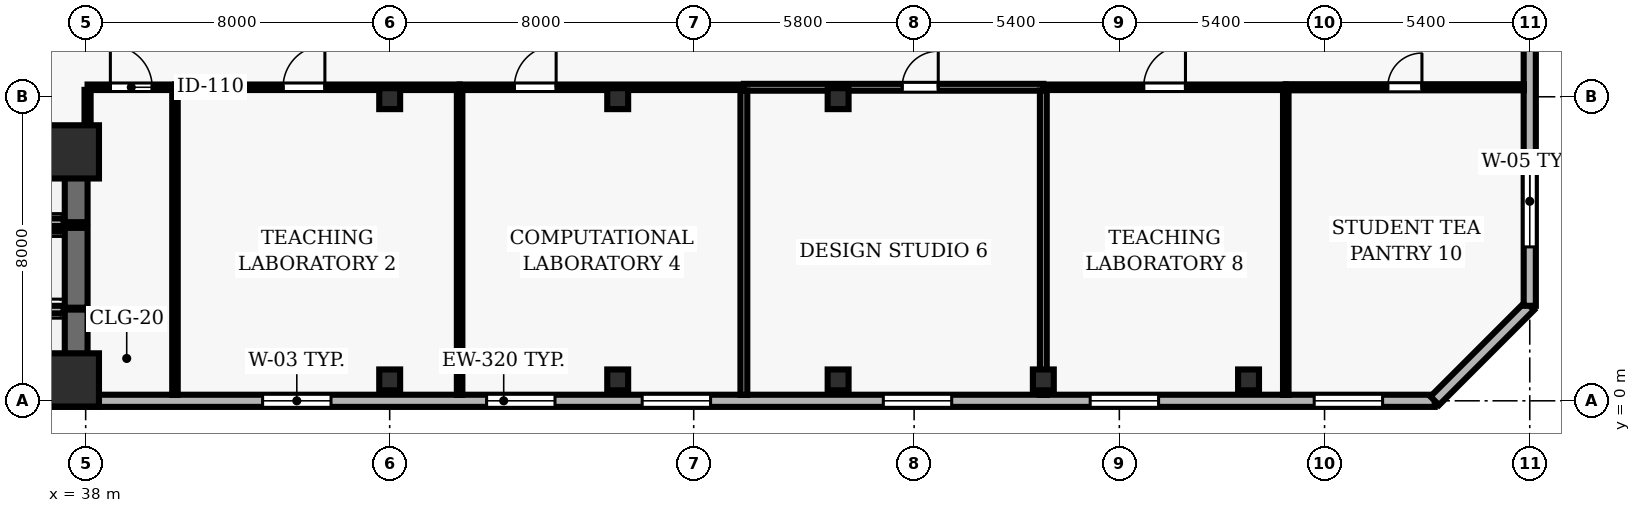
"""IFC4 building model, lengths in metres.
Left out: names, types, materials, properties, quantities, classifications, styles, units other than length and angle.
Written with IfcOpenShell. Run it as: python <this file> out.ifc"""

import sys

from ifc_helpers import new_model, si_unit, direction, frame, frame_2d, origin, origin_2d, place, context, subcontext, project, spatial, rectangle, hollow_rectangle, extrude, element, fill, save


model = new_model("IFC4")
c1 = context("Model", 3, precision=1e-05, world=origin(), true_north=direction((0.0, 1.0)))
c2 = subcontext(c1, "Body", "Model", "MODEL_VIEW")
j1 = project(units=[si_unit("LENGTHUNIT", "METRE"), si_unit("PLANEANGLEUNIT", "RADIAN")], contexts=[c1])
p1 = place(None, origin())
s1 = spatial("IfcSite", under=j1, at=p1, CompositionType="ELEMENT")
p2 = place(p1, origin())
s2 = spatial("IfcBuilding", under=s1, at=p2, CompositionType="ELEMENT")
p3 = place(p2, frame((0.0, 0.0, 62.2)))
s3 = spatial("IfcBuildingStorey", under=s2, at=p3, CompositionType="ELEMENT", Elevation=62.2)
for number, where, z_axis, x_axis in (
    (1, (37.65, 0.55, 0.0), (0.0, 0.0, 1.0), (1.0, 0.0, 0.0)),
    (2, (37.65, 6.55, 0.0), (0.0, 0.0, 1.0), (1.0, 0.0, 0.0)),
):
    element("IfcColumn", number, at=place(p3, frame(where, z_axis=z_axis, x_axis=x_axis)), inside=s3, PredefinedType="COLUMN", context=c2, shape_type="SweptSolid", body=[
        extrude(rectangle(XDim=1.4, YDim=1.4, at=origin_2d()), origin(), (0.0, 0.0, 1.0), 3.9),
    ])
for number, where, z_axis, x_axis in (
    (3, (46.0, 0.55, 0.0), (0.0, 0.0, 1.0), (1.0, 0.0, 0.0)),
    (4, (46.0, 7.95, 0.0), (0.0, 0.0, 1.0), (1.0, 0.0, 0.0)),
    (5, (52.0, 0.55, 0.0), (0.0, 0.0, 1.0), (1.0, 0.0, 0.0)),
    (6, (52.0, 7.95, 0.0), (0.0, 0.0, 1.0), (1.0, 0.0, 0.0)),
    (7, (57.8, 0.55, 0.0), (0.0, 0.0, 1.0), (1.0, 0.0, 0.0)),
    (8, (57.8, 7.95, 0.0), (0.0, 0.0, 1.0), (1.0, 0.0, 0.0)),
    (9, (63.2, 0.55, 0.0), (0.0, 0.0, 1.0), (1.0, 0.0, 0.0)),
    (10, (68.6, 0.55, 0.0), (0.0, 0.0, 1.0), (1.0, 0.0, 0.0)),
):
    element("IfcColumn", number, at=place(p3, frame(where, z_axis=z_axis, x_axis=x_axis)), inside=s3, PredefinedType="COLUMN", context=c2, shape_type="SweptSolid", body=[
        extrude(hollow_rectangle(XDim=0.55, YDim=0.55, WallThickness=0.025, at=origin_2d()), origin(), (0.0, 0.0, 1.0), 3.9),
    ])
p4 = place(p3, frame((24.5, 0.0, 0.0), z_axis=(0.0, 0.0, 1.0), x_axis=(1.0, 0.0, 0.0)))
e11 = element("IfcWall", 11, at=p4, inside=s3, PredefinedType="SOLIDWALL", context=c2, shape_type="SweptSolid", body=[
    extrude(rectangle(XDim=49.0, YDim=0.32, at=frame_2d((24.5, 0.0))), origin(), (0.0, 0.0, 1.0), 3.69),
])
p5 = place(p4, frame((1.822, 0.0, 0.9)))
e12 = element("IfcOpeningElement", 12, at=p5, cuts=e11, PredefinedType="OPENING", context=c2, shape_type="SweptSolid", body=[
    extrude(rectangle(XDim=1.8, YDim=1.6, at=frame_2d((0.9, 0.8))), frame((0.0, 0.17, 0.0), z_axis=(0.0, -1.0, 0.0), x_axis=(1.0, 0.0, 0.0)), (0.0, 0.0, 1.0), 0.34),
])
p6 = place(p4, frame((18.156, 0.0, 0.9)))
e13 = element("IfcOpeningElement", 13, at=p6, cuts=e11, PredefinedType="OPENING", context=c2, shape_type="SweptSolid", body=[
    extrude(rectangle(XDim=1.8, YDim=1.6, at=frame_2d((0.9, 0.8))), frame((0.0, 0.17, 0.0), z_axis=(0.0, -1.0, 0.0), x_axis=(1.0, 0.0, 0.0)), (0.0, 0.0, 1.0), 0.34),
])
p7 = place(p4, frame((24.05, 0.0, 0.9)))
e14 = element("IfcOpeningElement", 14, at=p7, cuts=e11, PredefinedType="OPENING", context=c2, shape_type="SweptSolid", body=[
    extrude(rectangle(XDim=1.8, YDim=1.6, at=frame_2d((0.9, 0.8))), frame((0.0, 0.17, 0.0), z_axis=(0.0, -1.0, 0.0), x_axis=(1.0, 0.0, 0.0)), (0.0, 0.0, 1.0), 0.34),
])
p8 = place(p4, frame((28.144, 0.0, 0.9)))
e15 = element("IfcOpeningElement", 15, at=p8, cuts=e11, PredefinedType="OPENING", context=c2, shape_type="SweptSolid", body=[
    extrude(rectangle(XDim=1.8, YDim=1.6, at=frame_2d((0.9, 0.8))), frame((0.0, 0.17, 0.0), z_axis=(0.0, -1.0, 0.0), x_axis=(1.0, 0.0, 0.0)), (0.0, 0.0, 1.0), 0.34),
])
p9 = place(p4, frame((34.489, 0.0, 0.9)))
e16 = element("IfcOpeningElement", 16, at=p9, cuts=e11, PredefinedType="OPENING", context=c2, shape_type="SweptSolid", body=[
    extrude(rectangle(XDim=1.8, YDim=1.6, at=frame_2d((0.9, 0.8))), frame((0.0, 0.17, 0.0), z_axis=(0.0, -1.0, 0.0), x_axis=(1.0, 0.0, 0.0)), (0.0, 0.0, 1.0), 0.34),
])
p10 = place(p4, frame((39.933, 0.0, 0.9)))
e17 = element("IfcOpeningElement", 17, at=p10, cuts=e11, PredefinedType="OPENING", context=c2, shape_type="SweptSolid", body=[
    extrude(rectangle(XDim=1.8, YDim=1.6, at=frame_2d((0.9, 0.8))), frame((0.0, 0.17, 0.0), z_axis=(0.0, -1.0, 0.0), x_axis=(1.0, 0.0, 0.0)), (0.0, 0.0, 1.0), 0.34),
])
p11 = place(p4, frame((45.828, 0.0, 0.9)))
e18 = element("IfcOpeningElement", 18, at=p11, cuts=e11, PredefinedType="OPENING", context=c2, shape_type="SweptSolid", body=[
    extrude(rectangle(XDim=1.8, YDim=1.6, at=frame_2d((0.9, 0.8))), frame((0.0, 0.17, 0.0), z_axis=(0.0, -1.0, 0.0), x_axis=(1.0, 0.0, 0.0)), (0.0, 0.0, 1.0), 0.34),
])
p12 = place(p3, frame((73.5, 0.0, 0.0), z_axis=(0.0, 0.0, 1.0), x_axis=(0.707106781187, 0.707106781187, 0.0)))
e19 = element("IfcWall", 19, at=p12, inside=s3, PredefinedType="SOLIDWALL", context=c2, shape_type="SweptSolid", body=[
    extrude(rectangle(XDim=3.536, YDim=0.32, at=frame_2d((1.768, 0.0))), origin(), (0.0, 0.0, 1.0), 3.69),
])
p13 = place(p3, frame((76.0, 2.5, 0.0), z_axis=(0.0, 0.0, 1.0), x_axis=(0.0, 1.0, 0.0)))
e20 = element("IfcWall", 20, at=p13, inside=s3, PredefinedType="SOLIDWALL", context=c2, shape_type="SweptSolid", body=[
    extrude(rectangle(XDim=11.0, YDim=0.32, at=frame_2d((5.5, 0.0))), origin(), (0.0, 0.0, 1.0), 3.69),
])
p14 = place(p13, frame((1.55, 0.0, 0.9)))
e21 = element("IfcOpeningElement", 21, at=p14, cuts=e20, PredefinedType="OPENING", context=c2, shape_type="SweptSolid", body=[
    extrude(rectangle(XDim=2.4, YDim=1.6, at=frame_2d((1.2, 0.8))), frame((0.0, 0.17, 0.0), z_axis=(0.0, -1.0, 0.0), x_axis=(1.0, 0.0, 0.0)), (0.0, 0.0, 1.0), 0.34),
])
p15 = place(p3, frame((37.75, 0.3, 0.0), z_axis=(0.0, 0.0, 1.0), x_axis=(0.0, 1.0, 0.0)))
e22 = element("IfcWall", 22, at=p15, inside=s3, PredefinedType="SHEAR", context=c2, shape_type="SweptSolid", body=[
    extrude(rectangle(XDim=2.1, YDim=0.6, at=frame_2d((1.05, 0.0))), origin(), (0.0, 0.0, 1.0), 3.69),
])
for number, where, z_axis, x_axis in (
    (23, (35.28, 0.3, 0.0), (0.0, 0.0, 1.0), (1.0, 0.0, 0.0)),
    (24, (37.42, 2.4, 0.0), (0.0, 0.0, 1.0), (-1.0, 0.0, 0.0)),
):
    element("IfcWall", number, at=place(p3, frame(where, z_axis=z_axis, x_axis=x_axis)), inside=s3, PredefinedType="SOLIDWALL", context=c2, shape_type="SweptSolid", body=[
        extrude(rectangle(XDim=2.14, YDim=0.2, at=frame_2d((1.07, 0.0))), origin(), (0.0, 0.0, 1.0), 3.69),
    ])
p16 = place(p3, frame((37.75, 2.45, 0.0), z_axis=(0.0, 0.0, 1.0), x_axis=(0.0, 1.0, 0.0)))
e25 = element("IfcWall", 25, at=p16, inside=s3, PredefinedType="SHEAR", context=c2, shape_type="SweptSolid", body=[
    extrude(rectangle(XDim=2.1, YDim=0.6, at=frame_2d((1.05, 0.0))), origin(), (0.0, 0.0, 1.0), 3.69),
])
p17 = place(p3, frame((37.42, 4.55, 0.0), z_axis=(0.0, 0.0, 1.0), x_axis=(-1.0, 0.0, 0.0)))
e26 = element("IfcWall", 26, at=p17, inside=s3, PredefinedType="SOLIDWALL", context=c2, shape_type="SweptSolid", body=[
    extrude(rectangle(XDim=2.14, YDim=0.2, at=frame_2d((1.07, 0.0))), origin(), (0.0, 0.0, 1.0), 3.69),
])
p18 = place(p3, frame((37.75, 4.7, 0.0), z_axis=(0.0, 0.0, 1.0), x_axis=(0.0, 1.0, 0.0)))
e27 = element("IfcWall", 27, at=p18, inside=s3, PredefinedType="SHEAR", context=c2, shape_type="SweptSolid", body=[
    extrude(rectangle(XDim=2.25, YDim=0.6, at=frame_2d((1.125, 0.0))), origin(), (0.0, 0.0, 1.0), 3.69),
])
for number, where, z_axis, x_axis in (
    (28, (35.28, 4.7, 0.0), (0.0, 0.0, 1.0), (1.0, 0.0, 0.0)),
    (29, (37.42, 6.95, 0.0), (0.0, 0.0, 1.0), (-1.0, 0.0, 0.0)),
):
    element("IfcWall", number, at=place(p3, frame(where, z_axis=z_axis, x_axis=x_axis)), inside=s3, PredefinedType="SOLIDWALL", context=c2, shape_type="SweptSolid", body=[
        extrude(rectangle(XDim=2.14, YDim=0.2, at=frame_2d((1.07, 0.0))), origin(), (0.0, 0.0, 1.0), 3.69),
    ])
p19 = place(p3, frame((38.05, 8.25, 0.0), z_axis=(0.0, 0.0, 1.0), x_axis=(1.0, 0.0, 0.0)))
e30 = element("IfcWall", 30, at=p19, inside=s3, PredefinedType="PARTITIONING", context=c2, shape_type="SweptSolid", body=[
    extrude(rectangle(XDim=2.3, YDim=0.145, at=frame_2d((1.15, 0.0))), origin(), (0.0, 0.0, 1.0), 2.995),
])
p20 = place(p19, frame((0.6, 0.0, 0.0)))
e31 = element("IfcOpeningElement", 31, at=p20, cuts=e30, PredefinedType="OPENING", context=c2, shape_type="SweptSolid", body=[
    extrude(rectangle(XDim=1.1, YDim=2.15, at=frame_2d((0.55, 1.075))), frame((0.0, 0.083, 0.0), z_axis=(0.0, -1.0, 0.0), x_axis=(1.0, 0.0, 0.0)), (0.0, 0.0, 1.0), 0.165),
])
p21 = place(p3, frame((40.35, 8.25, 0.0), z_axis=(0.0, 0.0, 1.0), x_axis=(1.0, 0.0, 0.0)))
e32 = element("IfcWall", 32, at=p21, inside=s3, PredefinedType="PARTITIONING", context=c2, shape_type="SweptSolid", body=[
    extrude(rectangle(XDim=7.49, YDim=0.145, at=frame_2d((3.745, 0.0))), origin(), (0.0, 0.0, 1.0), 2.995),
])
p22 = place(p21, frame((2.845, 0.0, 0.0)))
e33 = element("IfcOpeningElement", 33, at=p22, cuts=e32, PredefinedType="OPENING", context=c2, shape_type="SweptSolid", body=[
    extrude(rectangle(XDim=1.1, YDim=2.15, at=frame_2d((0.55, 1.075))), frame((0.0, 0.083, 0.0), z_axis=(0.0, -1.0, 0.0), x_axis=(1.0, 0.0, 0.0)), (0.0, 0.0, 1.0), 0.165),
])
p23 = place(p3, frame((47.84, 8.25, 0.0), z_axis=(0.0, 0.0, 1.0), x_axis=(1.0, 0.0, 0.0)))
e34 = element("IfcWall", 34, at=p23, inside=s3, PredefinedType="PARTITIONING", context=c2, shape_type="SweptSolid", body=[
    extrude(rectangle(XDim=7.48, YDim=0.145, at=frame_2d((3.74, 0.0))), origin(), (0.0, 0.0, 1.0), 2.995),
])
p24 = place(p23, frame((1.44, 0.0, 0.0)))
e35 = element("IfcOpeningElement", 35, at=p24, cuts=e34, PredefinedType="OPENING", context=c2, shape_type="SweptSolid", body=[
    extrude(rectangle(XDim=1.1, YDim=2.15, at=frame_2d((0.55, 1.075))), frame((0.0, 0.083, 0.0), z_axis=(0.0, -1.0, 0.0), x_axis=(1.0, 0.0, 0.0)), (0.0, 0.0, 1.0), 0.165),
])
p25 = place(p3, frame((55.32, 8.25, 0.0), z_axis=(0.0, 0.0, 1.0), x_axis=(1.0, 0.0, 0.0)))
e36 = element("IfcWall", 36, at=p25, inside=s3, PredefinedType="PARTITIONING", context=c2, shape_type="SweptSolid", body=[
    extrude(rectangle(XDim=7.88, YDim=0.18, at=frame_2d((3.94, 0.0))), origin(), (0.0, 0.0, 1.0), 2.995),
])
p26 = place(p25, frame((4.165, 0.0, 0.0)))
e37 = element("IfcOpeningElement", 37, at=p26, cuts=e36, PredefinedType="OPENING", context=c2, shape_type="SweptSolid", body=[
    extrude(rectangle(XDim=0.95, YDim=2.1, at=frame_2d((0.475, 1.05))), frame((0.0, 0.1, 0.0), z_axis=(0.0, -1.0, 0.0), x_axis=(1.0, 0.0, 0.0)), (0.0, 0.0, 1.0), 0.2),
])
p27 = place(p3, frame((63.2, 8.25, 0.0), z_axis=(0.0, 0.0, 1.0), x_axis=(1.0, 0.0, 0.0)))
e38 = element("IfcWall", 38, at=p27, inside=s3, PredefinedType="PARTITIONING", context=c2, shape_type="SweptSolid", body=[
    extrude(rectangle(XDim=6.38, YDim=0.145, at=frame_2d((3.19, 0.0))), origin(), (0.0, 0.0, 1.0), 3.69),
])
p28 = place(p27, frame((2.64, 0.0, 0.0)))
e39 = element("IfcOpeningElement", 39, at=p28, cuts=e38, PredefinedType="OPENING", context=c2, shape_type="SweptSolid", body=[
    extrude(rectangle(XDim=1.1, YDim=2.15, at=frame_2d((0.55, 1.075))), frame((0.0, 0.083, 0.0), z_axis=(0.0, -1.0, 0.0), x_axis=(1.0, 0.0, 0.0)), (0.0, 0.0, 1.0), 0.165),
])
p29 = place(p3, frame((69.58, 8.25, 0.0), z_axis=(0.0, 0.0, 1.0), x_axis=(1.0, 0.0, 0.0)))
e40 = element("IfcWall", 40, at=p29, inside=s3, PredefinedType="PARTITIONING", context=c2, shape_type="SweptSolid", body=[
    extrude(rectangle(XDim=6.265, YDim=0.16, at=frame_2d((3.132, 0.0))), origin(), (0.0, 0.0, 1.0), 3.69),
])
p30 = place(p29, frame((2.683, 0.0, 0.0)))
e41 = element("IfcOpeningElement", 41, at=p30, cuts=e40, PredefinedType="OPENING", context=c2, shape_type="SweptSolid", body=[
    extrude(rectangle(XDim=0.9, YDim=2.1, at=frame_2d((0.45, 1.05))), frame((0.0, 0.09, 0.0), z_axis=(0.0, -1.0, 0.0), x_axis=(1.0, 0.0, 0.0)), (0.0, 0.0, 1.0), 0.18),
])
p31 = place(p3, frame((38.05, 7.05, 0.0), z_axis=(0.0, 0.0, 1.0), x_axis=(0.0, 1.0, 0.0)))
e42 = element("IfcWall", 42, at=p31, inside=s3, PredefinedType="PARTITIONING", context=c2, shape_type="SweptSolid", body=[
    extrude(rectangle(XDim=1.132, YDim=0.16, at=frame_2d((0.566, 0.0))), origin(), (0.0, 0.0, 1.0), 2.995),
])
for number, where, z_axis, x_axis in (
    (43, (40.35, 0.155, 0.0), (0.0, 0.0, 1.0), (0.0, 1.0, 0.0)),
    (44, (47.84, 0.155, 0.0), (0.0, 0.0, 1.0), (0.0, 1.0, 0.0)),
):
    element("IfcWall", number, at=place(p3, frame(where, z_axis=z_axis, x_axis=x_axis)), inside=s3, PredefinedType="PARTITIONING", context=c2, shape_type="SweptSolid", body=[
        extrude(rectangle(XDim=8.027, YDim=0.145, at=frame_2d((4.013, 0.0))), origin(), (0.0, 0.0, 1.0), 3.69),
    ])
p32 = place(p3, frame((55.32, 0.155, 0.0), z_axis=(0.0, 0.0, 1.0), x_axis=(0.0, 1.0, 0.0)))
e45 = element("IfcWall", 45, at=p32, inside=s3, PredefinedType="PARTITIONING", context=c2, shape_type="SweptSolid", body=[
    extrude(rectangle(XDim=8.01, YDim=0.18, at=frame_2d((4.005, 0.0))), origin(), (0.0, 0.0, 1.0), 3.69),
])
p33 = place(p3, frame((63.2, 0.155, 0.0), z_axis=(0.0, 0.0, 1.0), x_axis=(0.0, 1.0, 0.0)))
e46 = element("IfcWall", 46, at=p33, inside=s3, PredefinedType="PARTITIONING", context=c2, shape_type="SweptSolid", body=[
    extrude(rectangle(XDim=8.01, YDim=0.18, at=frame_2d((4.005, 0.0))), origin(), (0.0, 0.0, 1.0), 2.995),
])
p34 = place(p3, frame((69.58, 0.155, 0.0), z_axis=(0.0, 0.0, 1.0), x_axis=(0.0, 1.0, 0.0)))
e47 = element("IfcWall", 47, at=p34, inside=s3, PredefinedType="PARTITIONING", context=c2, shape_type="SweptSolid", body=[
    extrude(rectangle(XDim=8.02, YDim=0.145, at=frame_2d((4.01, 0.0))), origin(), (0.0, 0.0, 1.0), 3.69),
])
p35 = place(p6, origin())
e48 = element("IfcWindow", 48, at=p35, inside=s3, PartitioningType="SINGLE_PANEL", PredefinedType="WINDOW", context=c2, shape_type="SweptSolid", body=[
    extrude(rectangle(XDim=1.8, YDim=1.6, at=frame_2d((0.9, 0.8))), frame((0.0, 0.03, 0.0), z_axis=(0.0, -1.0, 0.0), x_axis=(1.0, 0.0, 0.0)), (0.0, 0.0, 1.0), 0.06),
])
fill(e13, e48)
p36 = place(p7, origin())
e49 = element("IfcWindow", 49, at=p36, inside=s3, PartitioningType="SINGLE_PANEL", PredefinedType="WINDOW", context=c2, shape_type="SweptSolid", body=[
    extrude(rectangle(XDim=1.8, YDim=1.6, at=frame_2d((0.9, 0.8))), frame((0.0, 0.03, 0.0), z_axis=(0.0, -1.0, 0.0), x_axis=(1.0, 0.0, 0.0)), (0.0, 0.0, 1.0), 0.06),
])
fill(e14, e49)
p37 = place(p8, origin())
e50 = element("IfcWindow", 50, at=p37, inside=s3, PartitioningType="SINGLE_PANEL", PredefinedType="WINDOW", context=c2, shape_type="SweptSolid", body=[
    extrude(rectangle(XDim=1.8, YDim=1.6, at=frame_2d((0.9, 0.8))), frame((0.0, 0.03, 0.0), z_axis=(0.0, -1.0, 0.0), x_axis=(1.0, 0.0, 0.0)), (0.0, 0.0, 1.0), 0.06),
])
fill(e15, e50)
p38 = place(p9, origin())
e51 = element("IfcWindow", 51, at=p38, inside=s3, PartitioningType="SINGLE_PANEL", PredefinedType="WINDOW", context=c2, shape_type="SweptSolid", body=[
    extrude(rectangle(XDim=1.8, YDim=1.6, at=frame_2d((0.9, 0.8))), frame((0.0, 0.03, 0.0), z_axis=(0.0, -1.0, 0.0), x_axis=(1.0, 0.0, 0.0)), (0.0, 0.0, 1.0), 0.06),
])
fill(e16, e51)
p39 = place(p10, origin())
e52 = element("IfcWindow", 52, at=p39, inside=s3, PartitioningType="SINGLE_PANEL", PredefinedType="WINDOW", context=c2, shape_type="SweptSolid", body=[
    extrude(rectangle(XDim=1.8, YDim=1.6, at=frame_2d((0.9, 0.8))), frame((0.0, 0.03, 0.0), z_axis=(0.0, -1.0, 0.0), x_axis=(1.0, 0.0, 0.0)), (0.0, 0.0, 1.0), 0.06),
])
fill(e17, e52)
p40 = place(p11, origin())
e53 = element("IfcWindow", 53, at=p40, inside=s3, PartitioningType="SINGLE_PANEL", PredefinedType="WINDOW", context=c2, shape_type="SweptSolid", body=[
    extrude(rectangle(XDim=1.8, YDim=1.6, at=frame_2d((0.9, 0.8))), frame((0.0, 0.03, 0.0), z_axis=(0.0, -1.0, 0.0), x_axis=(1.0, 0.0, 0.0)), (0.0, 0.0, 1.0), 0.06),
])
fill(e18, e53)
p41 = place(p14, origin())
e54 = element("IfcWindow", 54, at=p41, inside=s3, PartitioningType="SINGLE_PANEL", PredefinedType="WINDOW", context=c2, shape_type="SweptSolid", body=[
    extrude(rectangle(XDim=2.4, YDim=1.6, at=frame_2d((1.2, 0.8))), frame((0.0, 0.03, 0.0), z_axis=(0.0, -1.0, 0.0), x_axis=(1.0, 0.0, 0.0)), (0.0, 0.0, 1.0), 0.06),
])
fill(e21, e54)
p42 = place(p20, origin())
e55 = element("IfcDoor", 55, at=p42, inside=s3, OperationType="SINGLE_SWING_LEFT", PredefinedType="DOOR", context=c2, shape_type="SweptSolid", body=[
    extrude(rectangle(XDim=1.1, YDim=2.15, at=frame_2d((0.55, 1.075))), frame((0.0, 0.025, 0.0), z_axis=(0.0, -1.0, 0.0), x_axis=(1.0, 0.0, 0.0)), (0.0, 0.0, 1.0), 0.05),
])
fill(e31, e55)
p43 = place(p22, origin())
e56 = element("IfcDoor", 56, at=p43, inside=s3, OperationType="SINGLE_SWING_RIGHT", PredefinedType="DOOR", context=c2, shape_type="SweptSolid", body=[
    extrude(rectangle(XDim=1.1, YDim=2.15, at=frame_2d((0.55, 1.075))), frame((0.0, 0.025, 0.0), z_axis=(0.0, -1.0, 0.0), x_axis=(1.0, 0.0, 0.0)), (0.0, 0.0, 1.0), 0.05),
])
fill(e33, e56)
p44 = place(p24, origin())
e57 = element("IfcDoor", 57, at=p44, inside=s3, OperationType="SINGLE_SWING_RIGHT", PredefinedType="DOOR", context=c2, shape_type="SweptSolid", body=[
    extrude(rectangle(XDim=1.1, YDim=2.15, at=frame_2d((0.55, 1.075))), frame((0.0, 0.025, 0.0), z_axis=(0.0, -1.0, 0.0), x_axis=(1.0, 0.0, 0.0)), (0.0, 0.0, 1.0), 0.05),
])
fill(e35, e57)
p45 = place(p26, origin())
e58 = element("IfcDoor", 58, at=p45, inside=s3, OperationType="SINGLE_SWING_RIGHT", PredefinedType="DOOR", context=c2, shape_type="SweptSolid", body=[
    extrude(rectangle(XDim=0.95, YDim=2.1, at=frame_2d((0.475, 1.05))), frame((0.0, 0.025, 0.0), z_axis=(0.0, -1.0, 0.0), x_axis=(1.0, 0.0, 0.0)), (0.0, 0.0, 1.0), 0.05),
])
fill(e37, e58)
p46 = place(p28, origin())
e59 = element("IfcDoor", 59, at=p46, inside=s3, OperationType="SINGLE_SWING_RIGHT", PredefinedType="DOOR", context=c2, shape_type="SweptSolid", body=[
    extrude(rectangle(XDim=1.1, YDim=2.15, at=frame_2d((0.55, 1.075))), frame((0.0, 0.025, 0.0), z_axis=(0.0, -1.0, 0.0), x_axis=(1.0, 0.0, 0.0)), (0.0, 0.0, 1.0), 0.05),
])
fill(e39, e59)
p47 = place(p30, origin())
e60 = element("IfcDoor", 60, at=p47, inside=s3, OperationType="SINGLE_SWING_RIGHT", PredefinedType="DOOR", context=c2, shape_type="SweptSolid", body=[
    extrude(rectangle(XDim=0.9, YDim=2.1, at=frame_2d((0.45, 1.05))), frame((0.0, 0.025, 0.0), z_axis=(0.0, -1.0, 0.0), x_axis=(1.0, 0.0, 0.0)), (0.0, 0.0, 1.0), 0.05),
])
fill(e41, e60)
save(model, sys.argv[1])
